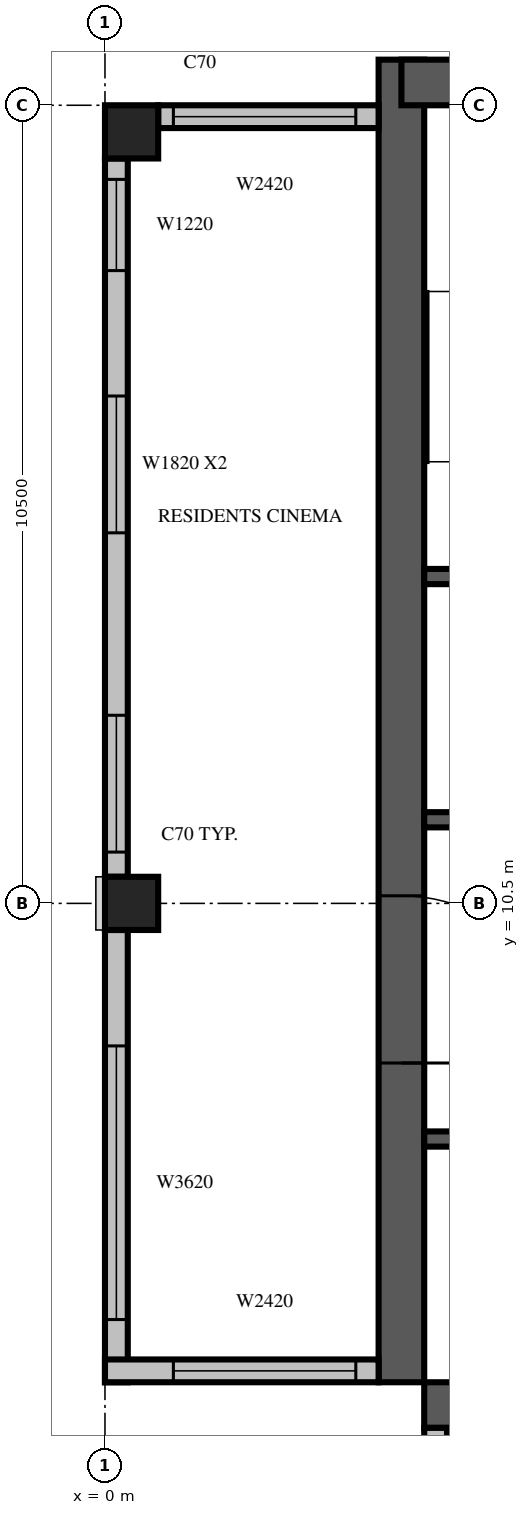
"""IFC4 building model, lengths in metres.
Left out: names, types, materials, properties, quantities, classifications, styles, units other than length and angle.
Written with IfcOpenShell. Run it as: python <this file> out.ifc"""

import sys

from ifc_helpers import new_model, si_unit, direction, frame, frame_2d, origin, origin_2d, place, context, subcontext, project, spatial, rectangle, extrude, source, transform, mapped, element, fill, save


model = new_model("IFC4")
c1 = context("Model", 3, precision=1e-05, world=origin(), true_north=direction((0.0, 1.0)))
c2 = subcontext(c1, "Body", "Model", "MODEL_VIEW")
j1 = project(units=[si_unit("LENGTHUNIT", "METRE"), si_unit("PLANEANGLEUNIT", "RADIAN")], contexts=[c1])
p1 = place(None, origin())
s1 = spatial("IfcSite", under=j1, at=p1, CompositionType="ELEMENT")
p2 = place(p1, origin())
s2 = spatial("IfcBuilding", under=s1, at=p2, CompositionType="ELEMENT")
p3 = place(p2, frame((0.0, 0.0, 309.0)))
s3 = spatial("IfcBuildingStorey", under=s2, at=p3, CompositionType="ELEMENT", Elevation=309.0)
m1 = source(origin(), c2, "Body", "SweptSolid", [
    extrude(rectangle(XDim=0.7, YDim=0.7, at=origin_2d()), origin(), (0.0, 0.0, 1.0), 3.5),
])
for number, where, z_axis, x_axis in (
    (1, (0.35, 10.5, 0.0), (0.0, 0.0, 1.0), (1.0, 0.0, 0.0)),
    (2, (0.35, 20.65, 0.0), (0.0, 0.0, 1.0), (1.0, 0.0, 0.0)),
):
    element("IfcColumn", number, at=place(p3, frame(where, z_axis=z_axis, x_axis=x_axis)), inside=s3, PredefinedType="COLUMN", context=c2, shape_type="MappedRepresentation", body=[
        mapped(m1, transform((0.0, 0.0, 0.0), scale=1.0)),
    ])
m2 = source(origin(), c2, "Body", "SweptSolid", [
    extrude(rectangle(XDim=17.4, YDim=0.6, at=frame_2d((8.7, 0.0))), origin(), (0.0, 0.0, 1.0), 3.5),
])
p4 = place(p3, frame((3.9, 4.2, 0.0), z_axis=(0.0, 0.0, 1.0), x_axis=(0.0, 1.0, 0.0)))
e3 = element("IfcWall", 3, at=p4, inside=s3, PredefinedType="SHEAR", context=c2, shape_type="MappedRepresentation", body=[
    mapped(m2, transform((0.0, 0.0, 0.0), scale=1.0)),
])
m3 = source(origin(), c2, "Body", "SweptSolid", [
    extrude(rectangle(XDim=2.2, YDim=2.1, at=frame_2d((1.1, 1.05))), frame((0.0, 0.31, 0.0), z_axis=(0.0, -1.0, 0.0), x_axis=(1.0, 0.0, 0.0)), (0.0, 0.0, 1.0), 0.62),
])
p5 = place(p4, frame((4.2, 0.0, 0.0)))
e4 = element("IfcOpeningElement", 4, at=p5, cuts=e3, PredefinedType="OPENING", context=c2, shape_type="MappedRepresentation", body=[
    mapped(m3, transform((0.0, 0.0, 0.0), scale=1.0)),
])
p6 = place(p3, frame((4.2, 3.9, 0.0), z_axis=(0.0, 0.0, 1.0), x_axis=(1.0, 0.0, 0.0)))
e5 = element("IfcWall", 5, at=p6, inside=s3, PredefinedType="SHEAR", context=c2, shape_type="MappedRepresentation", body=[
    mapped(m2, transform((0.0, 0.0, 0.0), scale=1.0)),
])
m4 = source(origin(), c2, "Body", "SweptSolid", [
    extrude(rectangle(XDim=0.9, YDim=2.1, at=frame_2d((0.45, 1.05))), frame((0.0, 0.31, 0.0), z_axis=(0.0, -1.0, 0.0), x_axis=(1.0, 0.0, 0.0)), (0.0, 0.0, 1.0), 0.62),
])
p7 = place(p6, frame((12.8, 0.0, 0.0)))
e6 = element("IfcOpeningElement", 6, at=p7, cuts=e5, PredefinedType="OPENING", context=c2, shape_type="MappedRepresentation", body=[
    mapped(m4, transform((0.0, 0.0, 0.0), scale=1.0)),
])
m5 = source(origin(), c2, "Body", "SweptSolid", [
    extrude(rectangle(XDim=6.6, YDim=0.6, at=frame_2d((3.3, 0.0))), origin(), (0.0, 0.0, 1.0), 3.5),
])
p8 = place(p3, frame((3.9, 21.3, 0.0), z_axis=(0.0, 0.0, 1.0), x_axis=(1.0, 0.0, 0.0)))
e7 = element("IfcWall", 7, at=p8, inside=s3, PredefinedType="SHEAR", context=c2, shape_type="MappedRepresentation", body=[
    mapped(m5, transform((0.0, 0.0, 0.0), scale=1.0)),
])
m6 = source(origin(), c2, "Body", "SweptSolid", [
    extrude(rectangle(XDim=1.2, YDim=2.4, at=frame_2d((0.6, 1.2))), frame((0.0, 0.31, 0.0), z_axis=(0.0, -1.0, 0.0), x_axis=(1.0, 0.0, 0.0)), (0.0, 0.0, 1.0), 0.62),
])
p9 = place(p8, frame((1.5, 0.0, 0.6)))
e8 = element("IfcOpeningElement", 8, at=p9, cuts=e7, PredefinedType="OPENING", context=c2, shape_type="MappedRepresentation", body=[
    mapped(m6, transform((0.0, 0.0, 0.0), scale=1.0)),
])
p10 = place(p8, frame((3.6, 0.0, 0.6)))
e9 = element("IfcOpeningElement", 9, at=p10, cuts=e7, PredefinedType="OPENING", context=c2, shape_type="MappedRepresentation", body=[
    mapped(m6, transform((0.0, 0.0, 0.0), scale=1.0)),
])
m7 = source(origin(), c2, "Body", "SweptSolid", [
    extrude(rectangle(XDim=2.9, YDim=0.3, at=frame_2d((1.45, 0.0))), origin(), (0.0, 0.0, 1.0), 3.1),
])
p11 = place(p3, frame((3.6, 20.85, 0.0), z_axis=(0.0, 0.0, 1.0), x_axis=(-1.0, 0.0, 0.0)))
e10 = element("IfcWall", 10, at=p11, inside=s3, PredefinedType="STANDARD", context=c2, shape_type="MappedRepresentation", body=[
    mapped(m7, transform((0.0, 0.0, 0.0), scale=1.0)),
])
m8 = source(origin(), c2, "Body", "SweptSolid", [
    extrude(rectangle(XDim=2.4, YDim=2.0, at=frame_2d((1.2, 1.0))), frame((0.0, 0.16, 0.0), z_axis=(0.0, -1.0, 0.0), x_axis=(1.0, 0.0, 0.0)), (0.0, 0.0, 1.0), 0.32),
])
p12 = place(p11, frame((0.3, 0.0, 0.6)))
e11 = element("IfcOpeningElement", 11, at=p12, cuts=e10, PredefinedType="OPENING", context=c2, shape_type="MappedRepresentation", body=[
    mapped(m8, transform((0.0, 0.0, 0.0), scale=1.0)),
])
m9 = source(origin(), c2, "Body", "SweptSolid", [
    extrude(rectangle(XDim=9.45, YDim=0.3, at=frame_2d((4.725, 0.0))), origin(), (0.0, 0.0, 1.0), 3.1),
])
p13 = place(p3, frame((0.15, 20.3, 0.0), z_axis=(0.0, 0.0, 1.0), x_axis=(0.0, -1.0, 0.0)))
e12 = element("IfcWall", 12, at=p13, inside=s3, PredefinedType="STANDARD", context=c2, shape_type="MappedRepresentation", body=[
    mapped(m9, transform((0.0, 0.0, 0.0), scale=1.0)),
])
m10 = source(origin(), c2, "Body", "SweptSolid", [
    extrude(rectangle(XDim=1.2, YDim=2.0, at=frame_2d((0.6, 1.0))), frame((0.0, 0.16, 0.0), z_axis=(0.0, -1.0, 0.0), x_axis=(1.0, 0.0, 0.0)), (0.0, 0.0, 1.0), 0.32),
])
p14 = place(p13, frame((0.275, 0.0, 0.6)))
e13 = element("IfcOpeningElement", 13, at=p14, cuts=e12, PredefinedType="OPENING", context=c2, shape_type="MappedRepresentation", body=[
    mapped(m10, transform((0.0, 0.0, 0.0), scale=1.0)),
])
m11 = source(origin(), c2, "Body", "SweptSolid", [
    extrude(rectangle(XDim=1.8, YDim=2.0, at=frame_2d((0.9, 1.0))), frame((0.0, 0.16, 0.0), z_axis=(0.0, -1.0, 0.0), x_axis=(1.0, 0.0, 0.0)), (0.0, 0.0, 1.0), 0.32),
])
p15 = place(p13, frame((3.125, 0.0, 0.6)))
e14 = element("IfcOpeningElement", 14, at=p15, cuts=e12, PredefinedType="OPENING", context=c2, shape_type="MappedRepresentation", body=[
    mapped(m11, transform((0.0, 0.0, 0.0), scale=1.0)),
])
p16 = place(p13, frame((7.325, 0.0, 0.6)))
e15 = element("IfcOpeningElement", 15, at=p16, cuts=e12, PredefinedType="OPENING", context=c2, shape_type="MappedRepresentation", body=[
    mapped(m11, transform((0.0, 0.0, 0.0), scale=1.0)),
])
m12 = source(origin(), c2, "Body", "SweptSolid", [
    extrude(rectangle(XDim=5.95, YDim=0.3, at=frame_2d((2.975, 0.0))), origin(), (0.0, 0.0, 1.0), 3.1),
])
p17 = place(p3, frame((0.15, 10.15, 0.0), z_axis=(0.0, 0.0, 1.0), x_axis=(0.0, -1.0, 0.0)))
e16 = element("IfcWall", 16, at=p17, inside=s3, PredefinedType="STANDARD", context=c2, shape_type="MappedRepresentation", body=[
    mapped(m12, transform((0.0, 0.0, 0.0), scale=1.0)),
])
m13 = source(origin(), c2, "Body", "SweptSolid", [
    extrude(rectangle(XDim=3.6, YDim=2.0, at=frame_2d((1.8, 1.0))), frame((0.0, 0.16, 0.0), z_axis=(0.0, -1.0, 0.0), x_axis=(1.0, 0.0, 0.0)), (0.0, 0.0, 1.0), 0.32),
])
p18 = place(p17, frame((1.525, 0.0, 0.6)))
e17 = element("IfcOpeningElement", 17, at=p18, cuts=e16, PredefinedType="OPENING", context=c2, shape_type="MappedRepresentation", body=[
    mapped(m13, transform((0.0, 0.0, 0.0), scale=1.0)),
])
m14 = source(origin(), c2, "Body", "SweptSolid", [
    extrude(rectangle(XDim=3.6, YDim=0.3, at=frame_2d((1.8, 0.0))), origin(), (0.0, 0.0, 1.0), 3.1),
])
p19 = place(p3, frame((0.0, 4.35, 0.0), z_axis=(0.0, 0.0, 1.0), x_axis=(1.0, 0.0, 0.0)))
e18 = element("IfcWall", 18, at=p19, inside=s3, PredefinedType="STANDARD", context=c2, shape_type="MappedRepresentation", body=[
    mapped(m14, transform((0.0, 0.0, 0.0), scale=1.0)),
])
p20 = place(p19, frame((0.9, 0.0, 0.6)))
e19 = element("IfcOpeningElement", 19, at=p20, cuts=e18, PredefinedType="OPENING", context=c2, shape_type="MappedRepresentation", body=[
    mapped(m8, transform((0.0, 0.0, 0.0), scale=1.0)),
])
p21 = place(p3, frame((4.35, 3.6, 0.0), z_axis=(0.0, 0.0, 1.0), x_axis=(0.0, -1.0, 0.0)))
e20 = element("IfcWall", 20, at=p21, inside=s3, PredefinedType="STANDARD", context=c2, shape_type="MappedRepresentation", body=[
    mapped(m14, transform((0.0, 0.0, 0.0), scale=1.0)),
])
p22 = place(p21, frame((0.3, 0.0, 0.6)))
e21 = element("IfcOpeningElement", 21, at=p22, cuts=e20, PredefinedType="OPENING", context=c2, shape_type="MappedRepresentation", body=[
    mapped(m8, transform((0.0, 0.0, 0.0), scale=1.0)),
])
m15 = source(origin(), c2, "Body", "SweptSolid", [
    extrude(rectangle(XDim=9.6, YDim=0.2, at=frame_2d((4.8, 0.0))), origin(), (0.0, 0.0, 1.0), 3.5),
])
p23 = place(p3, frame((4.2, 7.4, 0.0), z_axis=(0.0, 0.0, 1.0), x_axis=(1.0, 0.0, 0.0)))
e22 = element("IfcWall", 22, at=p23, inside=s3, PredefinedType="SOLIDWALL", context=c2, shape_type="MappedRepresentation", body=[
    mapped(m15, transform((0.0, 0.0, 0.0), scale=1.0)),
])
m16 = source(origin(), c2, "Body", "SweptSolid", [
    extrude(rectangle(XDim=1.1, YDim=2.1, at=frame_2d((0.55, 1.05))), frame((0.0, 0.11, 0.0), z_axis=(0.0, -1.0, 0.0), x_axis=(1.0, 0.0, 0.0)), (0.0, 0.0, 1.0), 0.22),
])
p24 = place(p23, frame((0.65, 0.0, 0.0)))
e23 = element("IfcOpeningElement", 23, at=p24, cuts=e22, PredefinedType="OPENING", context=c2, shape_type="MappedRepresentation", body=[
    mapped(m16, transform((0.0, 0.0, 0.0), scale=1.0)),
])
p25 = place(p23, frame((3.05, 0.0, 0.0)))
e24 = element("IfcOpeningElement", 24, at=p25, cuts=e22, PredefinedType="OPENING", context=c2, shape_type="MappedRepresentation", body=[
    mapped(m16, transform((0.0, 0.0, 0.0), scale=1.0)),
])
p26 = place(p23, frame((5.45, 0.0, 0.0)))
e25 = element("IfcOpeningElement", 25, at=p26, cuts=e22, PredefinedType="OPENING", context=c2, shape_type="MappedRepresentation", body=[
    mapped(m16, transform((0.0, 0.0, 0.0), scale=1.0)),
])
p27 = place(p23, frame((7.85, 0.0, 0.0)))
e26 = element("IfcOpeningElement", 26, at=p27, cuts=e22, PredefinedType="OPENING", context=c2, shape_type="MappedRepresentation", body=[
    mapped(m16, transform((0.0, 0.0, 0.0), scale=1.0)),
])
m17 = source(origin(), c2, "Body", "SweptSolid", [
    extrude(rectangle(XDim=4.8, YDim=0.2, at=frame_2d((2.4, 0.0))), origin(), (0.0, 0.0, 1.0), 3.5),
])
p28 = place(p3, frame((4.2, 11.6, 0.0), z_axis=(0.0, 0.0, 1.0), x_axis=(1.0, 0.0, 0.0)))
e27 = element("IfcWall", 27, at=p28, inside=s3, PredefinedType="SOLIDWALL", context=c2, shape_type="MappedRepresentation", body=[
    mapped(m17, transform((0.0, 0.0, 0.0), scale=1.0)),
])
p29 = place(p28, frame((0.65, 0.0, 0.0)))
e28 = element("IfcOpeningElement", 28, at=p29, cuts=e27, PredefinedType="OPENING", context=c2, shape_type="MappedRepresentation", body=[
    mapped(m16, transform((0.0, 0.0, 0.0), scale=1.0)),
])
p30 = place(p28, frame((3.05, 0.0, 0.0)))
e29 = element("IfcOpeningElement", 29, at=p30, cuts=e27, PredefinedType="OPENING", context=c2, shape_type="MappedRepresentation", body=[
    mapped(m16, transform((0.0, 0.0, 0.0), scale=1.0)),
])
p31 = place(p3, frame((4.2, 14.8, 0.0), z_axis=(0.0, 0.0, 1.0), x_axis=(1.0, 0.0, 0.0)))
e30 = element("IfcWall", 30, at=p31, inside=s3, PredefinedType="SOLIDWALL", context=c2, shape_type="MappedRepresentation", body=[
    mapped(m17, transform((0.0, 0.0, 0.0), scale=1.0)),
])
m18 = source(origin(), c2, "Body", "SweptSolid", [
    extrude(rectangle(XDim=2.4, YDim=2.0, at=frame_2d((1.2, 1.0))), frame((0.0, 0.03, 0.0), z_axis=(0.0, -1.0, 0.0), x_axis=(1.0, 0.0, 0.0)), (0.0, 0.0, 1.0), 0.06),
])
p32 = place(p12, origin())
e31 = element("IfcWindow", 31, at=p32, inside=s3, PartitioningType="SINGLE_PANEL", PredefinedType="WINDOW", context=c2, shape_type="MappedRepresentation", body=[
    mapped(m18, transform((0.0, 0.0, 0.0), scale=1.0)),
])
fill(e11, e31)
m19 = source(origin(), c2, "Body", "SweptSolid", [
    extrude(rectangle(XDim=1.2, YDim=2.0, at=frame_2d((0.6, 1.0))), frame((0.0, 0.03, 0.0), z_axis=(0.0, -1.0, 0.0), x_axis=(1.0, 0.0, 0.0)), (0.0, 0.0, 1.0), 0.06),
])
p33 = place(p14, origin())
e32 = element("IfcWindow", 32, at=p33, inside=s3, PartitioningType="SINGLE_PANEL", PredefinedType="WINDOW", context=c2, shape_type="MappedRepresentation", body=[
    mapped(m19, transform((0.0, 0.0, 0.0), scale=1.0)),
])
fill(e13, e32)
m20 = source(origin(), c2, "Body", "SweptSolid", [
    extrude(rectangle(XDim=1.8, YDim=2.0, at=frame_2d((0.9, 1.0))), frame((0.0, 0.03, 0.0), z_axis=(0.0, -1.0, 0.0), x_axis=(1.0, 0.0, 0.0)), (0.0, 0.0, 1.0), 0.06),
])
p34 = place(p15, origin())
e33 = element("IfcWindow", 33, at=p34, inside=s3, PartitioningType="SINGLE_PANEL", PredefinedType="WINDOW", context=c2, shape_type="MappedRepresentation", body=[
    mapped(m20, transform((0.0, 0.0, 0.0), scale=1.0)),
])
fill(e14, e33)
p35 = place(p16, origin())
e34 = element("IfcWindow", 34, at=p35, inside=s3, PartitioningType="SINGLE_PANEL", PredefinedType="WINDOW", context=c2, shape_type="MappedRepresentation", body=[
    mapped(m20, transform((0.0, 0.0, 0.0), scale=1.0)),
])
fill(e15, e34)
m21 = source(origin(), c2, "Body", "SweptSolid", [
    extrude(rectangle(XDim=3.6, YDim=2.0, at=frame_2d((1.8, 1.0))), frame((0.0, 0.03, 0.0), z_axis=(0.0, -1.0, 0.0), x_axis=(1.0, 0.0, 0.0)), (0.0, 0.0, 1.0), 0.06),
])
p36 = place(p18, origin())
e35 = element("IfcWindow", 35, at=p36, inside=s3, PartitioningType="SINGLE_PANEL", PredefinedType="WINDOW", context=c2, shape_type="MappedRepresentation", body=[
    mapped(m21, transform((0.0, 0.0, 0.0), scale=1.0)),
])
fill(e17, e35)
p37 = place(p20, origin())
e36 = element("IfcWindow", 36, at=p37, inside=s3, PartitioningType="SINGLE_PANEL", PredefinedType="WINDOW", context=c2, shape_type="MappedRepresentation", body=[
    mapped(m18, transform((0.0, 0.0, 0.0), scale=1.0)),
])
fill(e19, e36)
m22 = source(origin(), c2, "Body", "SweptSolid", [
    extrude(rectangle(XDim=2.2, YDim=2.1, at=frame_2d((1.1, 1.05))), frame((0.0, 0.025, 0.0), z_axis=(0.0, -1.0, 0.0), x_axis=(1.0, 0.0, 0.0)), (0.0, 0.0, 1.0), 0.05),
])
p38 = place(p5, origin())
e37 = element("IfcDoor", 37, at=p38, inside=s3, OperationType="DOUBLE_DOOR_SINGLE_SWING", PredefinedType="DOOR", context=c2, shape_type="MappedRepresentation", body=[
    mapped(m22, transform((0.0, 0.0, 0.0), scale=1.0)),
])
fill(e4, e37)
save(model, sys.argv[1])
